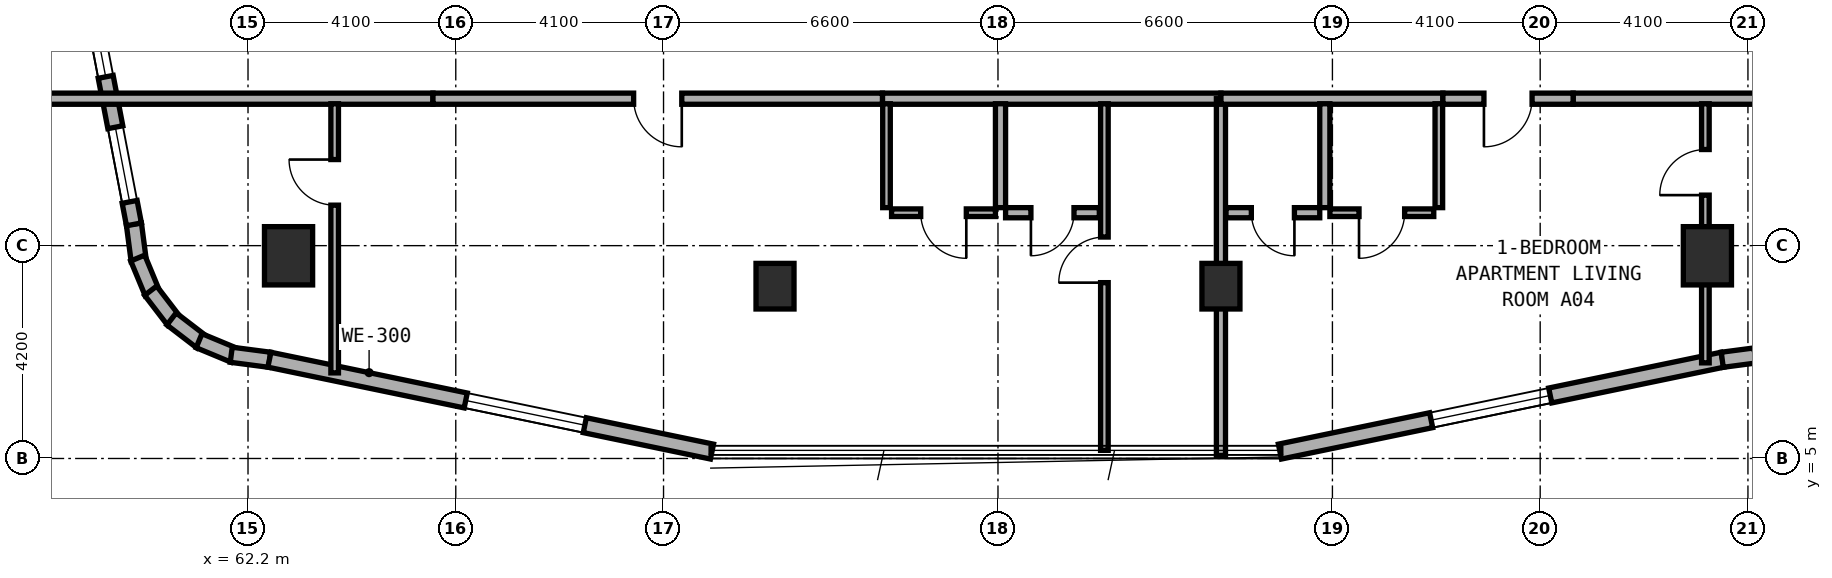
"""IFC4 building model, lengths in metres.
Left out: names, types, materials, properties, quantities, classifications, styles, units other than length and angle.
Written with IfcOpenShell. Run it as: python <this file> out.ifc"""

import sys

from ifc_helpers import new_model, si_unit, direction, frame, frame_2d, origin, origin_2d, place, context, subcontext, project, spatial, rectangle, extrude, element, fill, save


model = new_model("IFC4")
c1 = context("Model", 3, precision=1e-05, world=origin(), true_north=direction((0.0, 1.0)))
c2 = subcontext(c1, "Body", "Model", "MODEL_VIEW")
j1 = project(units=[si_unit("LENGTHUNIT", "METRE"), si_unit("PLANEANGLEUNIT", "RADIAN")], contexts=[c1])
p1 = place(None, origin())
s1 = spatial("IfcSite", under=j1, at=p1, CompositionType="ELEMENT")
p2 = place(p1, origin())
s2 = spatial("IfcBuilding", under=s1, at=p2, CompositionType="ELEMENT")
p3 = place(p2, frame((0.0, 0.0, 62.5)))
s3 = spatial("IfcBuildingStorey", under=s2, at=p3, CompositionType="ELEMENT", Elevation=62.5)
for number, where, z_axis, x_axis in (
    (1, (72.6, 8.4, 0.0), (0.0, 0.0, 1.0), (1.0, 0.0, 0.0)),
    (2, (81.4, 8.4, 0.0), (0.0, 0.0, 1.0), (1.0, 0.0, 0.0)),
):
    element("IfcColumn", number, at=place(p3, frame(where, z_axis=z_axis, x_axis=x_axis)), inside=s3, PredefinedType="COLUMN", context=c2, shape_type="SweptSolid", body=[
        extrude(rectangle(XDim=0.75, YDim=0.9, at=origin_2d()), origin(), (0.0, 0.0, 1.0), 3.5),
    ])
for number, where, z_axis, x_axis in (
    (3, (63.0, 9.0, 0.0), (0.0, 0.0, 1.0), (1.0, 0.0, 0.0)),
    (4, (91.0, 9.0, 0.0), (0.0, 0.0, 1.0), (1.0, 0.0, 0.0)),
):
    element("IfcColumn", number, at=place(p3, frame(where, z_axis=z_axis, x_axis=x_axis)), inside=s3, PredefinedType="COLUMN", context=c2, shape_type="SweptSolid", body=[
        extrude(rectangle(XDim=0.95, YDim=1.15, at=origin_2d()), origin(), (0.0, 0.0, 1.0), 3.5),
    ])
p4 = place(p3, frame((59.948, 9.627, 0.0), z_axis=(0.0, 0.0, 1.0), x_axis=(0.130255288807, -0.991480488834, 0.0)))
e5 = element("IfcWall", 5, at=p4, inside=s3, PredefinedType="STANDARD", context=c2, shape_type="SweptSolid", body=[
    extrude(rectangle(XDim=0.729, YDim=0.3, at=frame_2d((0.365, 0.0))), origin(), (0.0, 0.0, 1.0), 3.25),
])
for number, where, z_axis, x_axis in (
    (6, (60.024, 8.955, 0.0), (0.0, 0.0, 1.0), (0.384, -0.924, 0.0)),
    (7, (60.279, 8.311, 0.0), (0.0, 0.0, 1.0), (0.608, -0.794, 0.0)),
    (8, (60.691, 7.754, 0.0), (0.0, 0.0, 1.0), (0.794, -0.608, 0.0)),
    (9, (61.234, 7.324, 0.0), (0.0, 0.0, 1.0), (0.924, -0.383, 0.0)),
):
    element("IfcWall", number, at=place(p3, frame(where, z_axis=z_axis, x_axis=x_axis)), inside=s3, PredefinedType="STANDARD", context=c2, shape_type="SweptSolid", body=[
        extrude(rectangle(XDim=0.746, YDim=0.3, at=frame_2d((0.373, 0.0))), origin(), (0.0, 0.0, 1.0), 3.25),
    ])
p5 = place(p3, frame((61.869, 7.047, 0.0), z_axis=(0.0, 0.0, 1.0), x_axis=(0.991559404866, -0.129653178221, 0.0)))
e10 = element("IfcWall", 10, at=p5, inside=s3, PredefinedType="STANDARD", context=c2, shape_type="SweptSolid", body=[
    extrude(rectangle(XDim=0.764, YDim=0.3, at=frame_2d((0.382, 0.0))), origin(), (0.0, 0.0, 1.0), 3.25),
])
p6 = place(p3, frame((62.622, 6.949, 0.0), z_axis=(0.0, 0.0, 1.0), x_axis=(0.979127260729, -0.203248142175, 0.0)))
e11 = element("IfcWall", 11, at=p6, inside=s3, PredefinedType="STANDARD", context=c2, shape_type="SweptSolid", body=[
    extrude(rectangle(XDim=8.92, YDim=0.3, at=frame_2d((4.46, 0.0))), origin(), (0.0, 0.0, 1.0), 3.25),
])
p7 = place(p6, frame((3.957, 0.0, 0.8)))
e12 = element("IfcOpeningElement", 12, at=p7, cuts=e11, PredefinedType="OPENING", context=c2, shape_type="SweptSolid", body=[
    extrude(rectangle(XDim=2.4, YDim=1.6, at=frame_2d((1.2, 0.8))), frame((0.0, 0.16, 0.0), z_axis=(0.0, -1.0, 0.0), x_axis=(1.0, 0.0, 0.0)), (0.0, 0.0, 1.0), 0.32),
])
p8 = place(p3, frame((82.564, 5.136, 0.0), z_axis=(0.0, 0.0, 1.0), x_axis=(0.979128391325, 0.203242695569, 0.0)))
e13 = element("IfcWall", 13, at=p8, inside=s3, PredefinedType="STANDARD", context=c2, shape_type="SweptSolid", body=[
    extrude(rectangle(XDim=8.92, YDim=0.3, at=frame_2d((4.46, 0.0))), origin(), (0.0, 0.0, 1.0), 3.25),
])
p9 = place(p8, frame((3.048, 0.0, 0.8)))
e14 = element("IfcOpeningElement", 14, at=p9, cuts=e13, PredefinedType="OPENING", context=c2, shape_type="SweptSolid", body=[
    extrude(rectangle(XDim=2.4, YDim=1.6, at=frame_2d((1.2, 0.8))), frame((0.0, 0.16, 0.0), z_axis=(0.0, -1.0, 0.0), x_axis=(1.0, 0.0, 0.0)), (0.0, 0.0, 1.0), 0.32),
])
p10 = place(p3, frame((91.293, 6.948, 0.0), z_axis=(0.0, 0.0, 1.0), x_axis=(0.991486167159, 0.13021205909, 0.0)))
e15 = element("IfcWall", 15, at=p10, inside=s3, PredefinedType="STANDARD", context=c2, shape_type="SweptSolid", body=[
    extrude(rectangle(XDim=0.729, YDim=0.3, at=frame_2d((0.365, 0.0))), origin(), (0.0, 0.0, 1.0), 3.25),
])
p11 = place(p3, frame((58.137, 19.082, 0.0), z_axis=(0.0, 0.0, 1.0), x_axis=(0.188087874316, -0.982152203854, 0.0)))
e16 = element("IfcWall", 16, at=p11, inside=s3, PredefinedType="STANDARD", context=c2, shape_type="SweptSolid", body=[
    extrude(rectangle(XDim=9.634, YDim=0.3, at=frame_2d((4.817, 0.0))), origin(), (0.0, 0.0, 1.0), 3.25),
])
p12 = place(p11, frame((1.255, 0.0, 0.8)))
e17 = element("IfcOpeningElement", 17, at=p12, cuts=e16, PredefinedType="OPENING", context=c2, shape_type="SweptSolid", body=[
    extrude(rectangle(XDim=2.4, YDim=1.6, at=frame_2d((1.2, 0.8))), frame((0.0, 0.16, 0.0), z_axis=(0.0, -1.0, 0.0), x_axis=(1.0, 0.0, 0.0)), (0.0, 0.0, 1.0), 0.32),
])
p13 = place(p11, frame((5.47, 0.0, 0.85)))
e18 = element("IfcOpeningElement", 18, at=p13, cuts=e16, PredefinedType="OPENING", context=c2, shape_type="SweptSolid", body=[
    extrude(rectangle(XDim=1.2, YDim=1.5, at=frame_2d((0.6, 0.75))), frame((0.0, 0.16, 0.0), z_axis=(0.0, -1.0, 0.0), x_axis=(1.0, 0.0, 0.0)), (0.0, 0.0, 1.0), 0.32),
])
p14 = place(p11, frame((7.682, 0.0, 0.85)))
e19 = element("IfcOpeningElement", 19, at=p14, cuts=e16, PredefinedType="OPENING", context=c2, shape_type="SweptSolid", body=[
    extrude(rectangle(XDim=1.5, YDim=1.5, at=frame_2d((0.75, 0.75))), frame((0.0, 0.16, 0.0), z_axis=(0.0, -1.0, 0.0), x_axis=(1.0, 0.0, 0.0)), (0.0, 0.0, 1.0), 0.32),
])
p15 = place(p3, frame((58.16, 12.1, 0.0), z_axis=(0.0, 0.0, 1.0), x_axis=(1.0, 0.0, 0.0)))
e20 = element("IfcWall", 20, at=p15, inside=s3, PredefinedType="SOLIDWALL", context=c2, shape_type="SweptSolid", body=[
    extrude(rectangle(XDim=7.69, YDim=0.22, at=frame_2d((3.845, 0.0))), origin(), (0.0, 0.0, 1.0), 2.865),
])
p16 = place(p3, frame((74.72, 12.1, 0.0), z_axis=(0.0, 0.0, 1.0), x_axis=(1.0, 0.0, 0.0)))
e21 = element("IfcWall", 21, at=p16, inside=s3, PredefinedType="SOLIDWALL", context=c2, shape_type="SweptSolid", body=[
    extrude(rectangle(XDim=6.68, YDim=0.22, at=frame_2d((3.34, 0.0))), origin(), (0.0, 0.0, 1.0), 2.725),
])
p17 = place(p3, frame((65.85, 12.1, 0.0), z_axis=(0.0, 0.0, 1.0), x_axis=(1.0, 0.0, 0.0)))
e22 = element("IfcWall", 22, at=p17, inside=s3, PredefinedType="SOLIDWALL", context=c2, shape_type="SweptSolid", body=[
    extrude(rectangle(XDim=8.87, YDim=0.22, at=frame_2d((4.435, 0.0))), origin(), (0.0, 0.0, 1.0), 2.725),
])
p18 = place(p17, frame((3.96, 0.0, 0.0)))
e23 = element("IfcOpeningElement", 23, at=p18, cuts=e22, PredefinedType="OPENING", context=c2, shape_type="SweptSolid", body=[
    extrude(rectangle(XDim=0.95, YDim=2.1, at=frame_2d((0.475, 1.05))), frame((0.0, 0.12, 0.0), z_axis=(0.0, -1.0, 0.0), x_axis=(1.0, 0.0, 0.0)), (0.0, 0.0, 1.0), 0.24),
])
p19 = place(p3, frame((63.91, 6.689, 0.0), z_axis=(0.0, 0.0, 1.0), x_axis=(0.0, 1.0, 0.0)))
e24 = element("IfcWall", 24, at=p19, inside=s3, PredefinedType="PARTITIONING", context=c2, shape_type="SweptSolid", body=[
    extrude(rectangle(XDim=5.311, YDim=0.15, at=frame_2d((2.656, 0.0))), origin(), (0.0, 0.0, 1.0), 2.865),
])
p20 = place(p19, frame((3.31, 0.0, 0.0)))
e25 = element("IfcOpeningElement", 25, at=p20, cuts=e24, PredefinedType="OPENING", context=c2, shape_type="SweptSolid", body=[
    extrude(rectangle(XDim=0.9, YDim=2.1, at=frame_2d((0.45, 1.05))), frame((0.0, 0.085, 0.0), z_axis=(0.0, -1.0, 0.0), x_axis=(1.0, 0.0, 0.0)), (0.0, 0.0, 1.0), 0.17),
])
p21 = place(p3, frame((79.1, 5.16, 0.0), z_axis=(0.0, 0.0, 1.0), x_axis=(0.0, 1.0, 0.0)))
e26 = element("IfcWall", 26, at=p21, inside=s3, PredefinedType="PARTITIONING", context=c2, shape_type="SweptSolid", body=[
    extrude(rectangle(XDim=6.84, YDim=0.15, at=frame_2d((3.42, 0.0))), origin(), (0.0, 0.0, 1.0), 2.865),
])
p22 = place(p21, frame((3.31, 0.0, 0.0)))
e27 = element("IfcOpeningElement", 27, at=p22, cuts=e26, PredefinedType="OPENING", context=c2, shape_type="SweptSolid", body=[
    extrude(rectangle(XDim=0.9, YDim=2.1, at=frame_2d((0.45, 1.05))), frame((0.0, 0.085, 0.0), z_axis=(0.0, -1.0, 0.0), x_axis=(1.0, 0.0, 0.0)), (0.0, 0.0, 1.0), 0.17),
])
p23 = place(p3, frame((77.05, 9.95, 0.0), z_axis=(0.0, 0.0, 1.0), x_axis=(0.0, 1.0, 0.0)))
e28 = element("IfcWall", 28, at=p23, inside=s3, PredefinedType="PLUMBINGWALL", context=c2, shape_type="SweptSolid", body=[
    extrude(rectangle(XDim=2.05, YDim=0.2, at=frame_2d((1.025, 0.0))), origin(), (0.0, 0.0, 1.0), 2.895),
])
p24 = place(p3, frame((74.8, 9.95, 0.0), z_axis=(0.0, 0.0, 1.0), x_axis=(0.0, 1.0, 0.0)))
e29 = element("IfcWall", 29, at=p24, inside=s3, PredefinedType="PARTITIONING", context=c2, shape_type="SweptSolid", body=[
    extrude(rectangle(XDim=2.05, YDim=0.15, at=frame_2d((1.025, 0.0))), origin(), (0.0, 0.0, 1.0), 2.895),
])
p25 = place(p3, frame((77.15, 9.85, 0.0), z_axis=(0.0, 0.0, 1.0), x_axis=(1.0, 0.0, 0.0)))
e30 = element("IfcWall", 30, at=p25, inside=s3, PredefinedType="PLUMBINGWALL", context=c2, shape_type="SweptSolid", body=[
    extrude(rectangle(XDim=1.85, YDim=0.2, at=frame_2d((0.925, 0.0))), origin(), (0.0, 0.0, 1.0), 3.22),
])
p26 = place(p25, frame((0.5, 0.0, 0.0)))
e31 = element("IfcOpeningElement", 31, at=p26, cuts=e30, PredefinedType="OPENING", context=c2, shape_type="SweptSolid", body=[
    extrude(rectangle(XDim=0.85, YDim=2.1, at=frame_2d((0.425, 1.05))), frame((0.0, 0.11, 0.0), z_axis=(0.0, -1.0, 0.0), x_axis=(1.0, 0.0, 0.0)), (0.0, 0.0, 1.0), 0.22),
])
p27 = place(p3, frame((74.9, 9.85, 0.0), z_axis=(0.0, 0.0, 1.0), x_axis=(1.0, 0.0, 0.0)))
e32 = element("IfcWall", 32, at=p27, inside=s3, PredefinedType="PARTITIONING", context=c2, shape_type="SweptSolid", body=[
    extrude(rectangle(XDim=2.05, YDim=0.15, at=frame_2d((1.025, 0.0))), origin(), (0.0, 0.0, 1.0), 3.22),
])
p28 = place(p27, frame((0.575, 0.0, 0.0)))
e33 = element("IfcOpeningElement", 33, at=p28, cuts=e32, PredefinedType="OPENING", context=c2, shape_type="SweptSolid", body=[
    extrude(rectangle(XDim=0.9, YDim=2.1, at=frame_2d((0.45, 1.05))), frame((0.0, 0.085, 0.0), z_axis=(0.0, -1.0, 0.0), x_axis=(1.0, 0.0, 0.0)), (0.0, 0.0, 1.0), 0.17),
])
p29 = place(p3, frame((81.4, 5.06, 0.0), z_axis=(0.0, 0.0, 1.0), x_axis=(0.0, 1.0, 0.0)))
e34 = element("IfcWall", 34, at=p29, inside=s3, PredefinedType="SOLIDWALL", context=c2, shape_type="SweptSolid", body=[
    extrude(rectangle(XDim=7.04, YDim=0.18, at=frame_2d((3.52, 0.0))), origin(), (0.0, 0.0, 1.0), 2.725),
])
p30 = place(p3, frame((81.4, 12.1, 0.0), z_axis=(0.0, 0.0, 1.0), x_axis=(1.0, 0.0, 0.0)))
e35 = element("IfcWall", 35, at=p30, inside=s3, PredefinedType="SOLIDWALL", context=c2, shape_type="SweptSolid", body=[
    extrude(rectangle(XDim=4.38, YDim=0.22, at=frame_2d((2.19, 0.0))), origin(), (0.0, 0.0, 1.0), 2.725),
])
p31 = place(p3, frame((88.35, 12.1, 0.0), z_axis=(0.0, 0.0, 1.0), x_axis=(1.0, 0.0, 0.0)))
e36 = element("IfcWall", 36, at=p31, inside=s3, PredefinedType="SOLIDWALL", context=c2, shape_type="SweptSolid", body=[
    extrude(rectangle(XDim=7.41, YDim=0.22, at=frame_2d((3.705, 0.0))), origin(), (0.0, 0.0, 1.0), 2.865),
])
p32 = place(p3, frame((85.78, 12.1, 0.0), z_axis=(0.0, 0.0, 1.0), x_axis=(1.0, 0.0, 0.0)))
e37 = element("IfcWall", 37, at=p32, inside=s3, PredefinedType="SOLIDWALL", context=c2, shape_type="SweptSolid", body=[
    extrude(rectangle(XDim=2.57, YDim=0.22, at=frame_2d((1.285, 0.0))), origin(), (0.0, 0.0, 1.0), 3.22),
])
p33 = place(p32, frame((0.81, 0.0, 0.0)))
e38 = element("IfcOpeningElement", 38, at=p33, cuts=e37, PredefinedType="OPENING", context=c2, shape_type="SweptSolid", body=[
    extrude(rectangle(XDim=0.95, YDim=2.1, at=frame_2d((0.475, 1.05))), frame((0.0, 0.12, 0.0), z_axis=(0.0, -1.0, 0.0), x_axis=(1.0, 0.0, 0.0)), (0.0, 0.0, 1.0), 0.24),
])
p34 = place(p3, frame((90.96, 6.887, 0.0), z_axis=(0.0, 0.0, 1.0), x_axis=(0.0, 1.0, 0.0)))
e39 = element("IfcWall", 39, at=p34, inside=s3, PredefinedType="PARTITIONING", context=c2, shape_type="SweptSolid", body=[
    extrude(rectangle(XDim=5.113, YDim=0.15, at=frame_2d((2.557, 0.0))), origin(), (0.0, 0.0, 1.0), 2.865),
])
p35 = place(p34, frame((3.31, 0.0, 0.0)))
e40 = element("IfcOpeningElement", 40, at=p35, cuts=e39, PredefinedType="OPENING", context=c2, shape_type="SweptSolid", body=[
    extrude(rectangle(XDim=0.9, YDim=2.1, at=frame_2d((0.45, 1.05))), frame((0.0, 0.085, 0.0), z_axis=(0.0, -1.0, 0.0), x_axis=(1.0, 0.0, 0.0)), (0.0, 0.0, 1.0), 0.17),
])
p36 = place(p3, frame((83.45, 9.95, 0.0), z_axis=(0.0, 0.0, 1.0), x_axis=(0.0, 1.0, 0.0)))
e41 = element("IfcWall", 41, at=p36, inside=s3, PredefinedType="PLUMBINGWALL", context=c2, shape_type="SweptSolid", body=[
    extrude(rectangle(XDim=2.05, YDim=0.2, at=frame_2d((1.025, 0.0))), origin(), (0.0, 0.0, 1.0), 3.22),
])
p37 = place(p3, frame((85.7, 9.95, 0.0), z_axis=(0.0, 0.0, 1.0), x_axis=(0.0, 1.0, 0.0)))
e42 = element("IfcWall", 42, at=p37, inside=s3, PredefinedType="PARTITIONING", context=c2, shape_type="SweptSolid", body=[
    extrude(rectangle(XDim=2.05, YDim=0.15, at=frame_2d((1.025, 0.0))), origin(), (0.0, 0.0, 1.0), 3.22),
])
p38 = place(p3, frame((81.5, 9.85, 0.0), z_axis=(0.0, 0.0, 1.0), x_axis=(1.0, 0.0, 0.0)))
e43 = element("IfcWall", 43, at=p38, inside=s3, PredefinedType="PLUMBINGWALL", context=c2, shape_type="SweptSolid", body=[
    extrude(rectangle(XDim=1.85, YDim=0.2, at=frame_2d((0.925, 0.0))), origin(), (0.0, 0.0, 1.0), 2.725),
])
p39 = place(p38, frame((0.5, 0.0, 0.0)))
e44 = element("IfcOpeningElement", 44, at=p39, cuts=e43, PredefinedType="OPENING", context=c2, shape_type="SweptSolid", body=[
    extrude(rectangle(XDim=0.85, YDim=2.1, at=frame_2d((0.425, 1.05))), frame((0.0, 0.11, 0.0), z_axis=(0.0, -1.0, 0.0), x_axis=(1.0, 0.0, 0.0)), (0.0, 0.0, 1.0), 0.22),
])
p40 = place(p3, frame((83.55, 9.85, 0.0), z_axis=(0.0, 0.0, 1.0), x_axis=(1.0, 0.0, 0.0)))
e45 = element("IfcWall", 45, at=p40, inside=s3, PredefinedType="PARTITIONING", context=c2, shape_type="SweptSolid", body=[
    extrude(rectangle(XDim=2.05, YDim=0.15, at=frame_2d((1.025, 0.0))), origin(), (0.0, 0.0, 1.0), 3.22),
])
p41 = place(p40, frame((0.575, 0.0, 0.0)))
e46 = element("IfcOpeningElement", 46, at=p41, cuts=e45, PredefinedType="OPENING", context=c2, shape_type="SweptSolid", body=[
    extrude(rectangle(XDim=0.9, YDim=2.1, at=frame_2d((0.45, 1.05))), frame((0.0, 0.085, 0.0), z_axis=(0.0, -1.0, 0.0), x_axis=(1.0, 0.0, 0.0)), (0.0, 0.0, 1.0), 0.17),
])
p42 = place(p7, origin())
e47 = element("IfcWindow", 47, at=p42, inside=s3, PartitioningType="SINGLE_PANEL", PredefinedType="WINDOW", context=c2, shape_type="SweptSolid", body=[
    extrude(rectangle(XDim=2.4, YDim=1.6, at=frame_2d((1.2, 0.8))), frame((0.0, 0.03, 0.0), z_axis=(0.0, -1.0, 0.0), x_axis=(1.0, 0.0, 0.0)), (0.0, 0.0, 1.0), 0.06),
])
fill(e12, e47)
p43 = place(p9, origin())
e48 = element("IfcWindow", 48, at=p43, inside=s3, PartitioningType="SINGLE_PANEL", PredefinedType="WINDOW", context=c2, shape_type="SweptSolid", body=[
    extrude(rectangle(XDim=2.4, YDim=1.6, at=frame_2d((1.2, 0.8))), frame((0.0, 0.03, 0.0), z_axis=(0.0, -1.0, 0.0), x_axis=(1.0, 0.0, 0.0)), (0.0, 0.0, 1.0), 0.06),
])
fill(e14, e48)
p44 = place(p13, origin())
e49 = element("IfcWindow", 49, at=p44, inside=s3, PartitioningType="SINGLE_PANEL", PredefinedType="WINDOW", context=c2, shape_type="SweptSolid", body=[
    extrude(rectangle(XDim=1.2, YDim=1.5, at=frame_2d((0.6, 0.75))), frame((0.0, 0.03, 0.0), z_axis=(0.0, -1.0, 0.0), x_axis=(1.0, 0.0, 0.0)), (0.0, 0.0, 1.0), 0.06),
])
fill(e18, e49)
p45 = place(p14, origin())
e50 = element("IfcWindow", 50, at=p45, inside=s3, PartitioningType="SINGLE_PANEL", PredefinedType="WINDOW", context=c2, shape_type="SweptSolid", body=[
    extrude(rectangle(XDim=1.5, YDim=1.5, at=frame_2d((0.75, 0.75))), frame((0.0, 0.03, 0.0), z_axis=(0.0, -1.0, 0.0), x_axis=(1.0, 0.0, 0.0)), (0.0, 0.0, 1.0), 0.06),
])
fill(e19, e50)
p46 = place(p18, frame((0.95, 0.0, 0.0), z_axis=(0.0, 0.0, 1.0), x_axis=(-1.0, 0.0, 0.0)))
e51 = element("IfcDoor", 51, at=p46, inside=s3, OperationType="SINGLE_SWING_LEFT", PredefinedType="DOOR", context=c2, shape_type="SweptSolid", body=[
    extrude(rectangle(XDim=0.95, YDim=2.1, at=frame_2d((0.475, 1.05))), frame((0.0, 0.025, 0.0), z_axis=(0.0, -1.0, 0.0), x_axis=(1.0, 0.0, 0.0)), (0.0, 0.0, 1.0), 0.05),
])
fill(e23, e51)
p47 = place(p20, origin())
e52 = element("IfcDoor", 52, at=p47, inside=s3, OperationType="SINGLE_SWING_RIGHT", PredefinedType="DOOR", context=c2, shape_type="SweptSolid", body=[
    extrude(rectangle(XDim=0.9, YDim=2.1, at=frame_2d((0.45, 1.05))), frame((0.0, 0.025, 0.0), z_axis=(0.0, -1.0, 0.0), x_axis=(1.0, 0.0, 0.0)), (0.0, 0.0, 1.0), 0.05),
])
fill(e25, e52)
p48 = place(p22, origin())
e53 = element("IfcDoor", 53, at=p48, inside=s3, OperationType="SINGLE_SWING_LEFT", PredefinedType="DOOR", context=c2, shape_type="SweptSolid", body=[
    extrude(rectangle(XDim=0.9, YDim=2.1, at=frame_2d((0.45, 1.05))), frame((0.0, 0.025, 0.0), z_axis=(0.0, -1.0, 0.0), x_axis=(1.0, 0.0, 0.0)), (0.0, 0.0, 1.0), 0.05),
])
fill(e27, e53)
p49 = place(p26, frame((0.85, 0.0, 0.0), z_axis=(0.0, 0.0, 1.0), x_axis=(-1.0, 0.0, 0.0)))
e54 = element("IfcDoor", 54, at=p49, inside=s3, OperationType="SINGLE_SWING_RIGHT", PredefinedType="DOOR", context=c2, shape_type="SweptSolid", body=[
    extrude(rectangle(XDim=0.85, YDim=2.1, at=frame_2d((0.425, 1.05))), frame((0.0, 0.025, 0.0), z_axis=(0.0, -1.0, 0.0), x_axis=(1.0, 0.0, 0.0)), (0.0, 0.0, 1.0), 0.05),
])
fill(e31, e54)
p50 = place(p28, frame((0.9, 0.0, 0.0), z_axis=(0.0, 0.0, 1.0), x_axis=(-1.0, 0.0, 0.0)))
e55 = element("IfcDoor", 55, at=p50, inside=s3, OperationType="SINGLE_SWING_LEFT", PredefinedType="DOOR", context=c2, shape_type="SweptSolid", body=[
    extrude(rectangle(XDim=0.9, YDim=2.1, at=frame_2d((0.45, 1.05))), frame((0.0, 0.025, 0.0), z_axis=(0.0, -1.0, 0.0), x_axis=(1.0, 0.0, 0.0)), (0.0, 0.0, 1.0), 0.05),
])
fill(e33, e55)
p51 = place(p33, frame((0.95, 0.0, 0.0), z_axis=(0.0, 0.0, 1.0), x_axis=(-1.0, 0.0, 0.0)))
e56 = element("IfcDoor", 56, at=p51, inside=s3, OperationType="SINGLE_SWING_RIGHT", PredefinedType="DOOR", context=c2, shape_type="SweptSolid", body=[
    extrude(rectangle(XDim=0.95, YDim=2.1, at=frame_2d((0.475, 1.05))), frame((0.0, 0.025, 0.0), z_axis=(0.0, -1.0, 0.0), x_axis=(1.0, 0.0, 0.0)), (0.0, 0.0, 1.0), 0.05),
])
fill(e38, e56)
p52 = place(p35, origin())
e57 = element("IfcDoor", 57, at=p52, inside=s3, OperationType="SINGLE_SWING_LEFT", PredefinedType="DOOR", context=c2, shape_type="SweptSolid", body=[
    extrude(rectangle(XDim=0.9, YDim=2.1, at=frame_2d((0.45, 1.05))), frame((0.0, 0.025, 0.0), z_axis=(0.0, -1.0, 0.0), x_axis=(1.0, 0.0, 0.0)), (0.0, 0.0, 1.0), 0.05),
])
fill(e40, e57)
p53 = place(p39, frame((0.85, 0.0, 0.0), z_axis=(0.0, 0.0, 1.0), x_axis=(-1.0, 0.0, 0.0)))
e58 = element("IfcDoor", 58, at=p53, inside=s3, OperationType="SINGLE_SWING_LEFT", PredefinedType="DOOR", context=c2, shape_type="SweptSolid", body=[
    extrude(rectangle(XDim=0.85, YDim=2.1, at=frame_2d((0.425, 1.05))), frame((0.0, 0.025, 0.0), z_axis=(0.0, -1.0, 0.0), x_axis=(1.0, 0.0, 0.0)), (0.0, 0.0, 1.0), 0.05),
])
fill(e44, e58)
p54 = place(p41, frame((0.9, 0.0, 0.0), z_axis=(0.0, 0.0, 1.0), x_axis=(-1.0, 0.0, 0.0)))
e59 = element("IfcDoor", 59, at=p54, inside=s3, OperationType="SINGLE_SWING_RIGHT", PredefinedType="DOOR", context=c2, shape_type="SweptSolid", body=[
    extrude(rectangle(XDim=0.9, YDim=2.1, at=frame_2d((0.45, 1.05))), frame((0.0, 0.025, 0.0), z_axis=(0.0, -1.0, 0.0), x_axis=(1.0, 0.0, 0.0)), (0.0, 0.0, 1.0), 0.05),
])
fill(e46, e59)
save(model, sys.argv[1])
